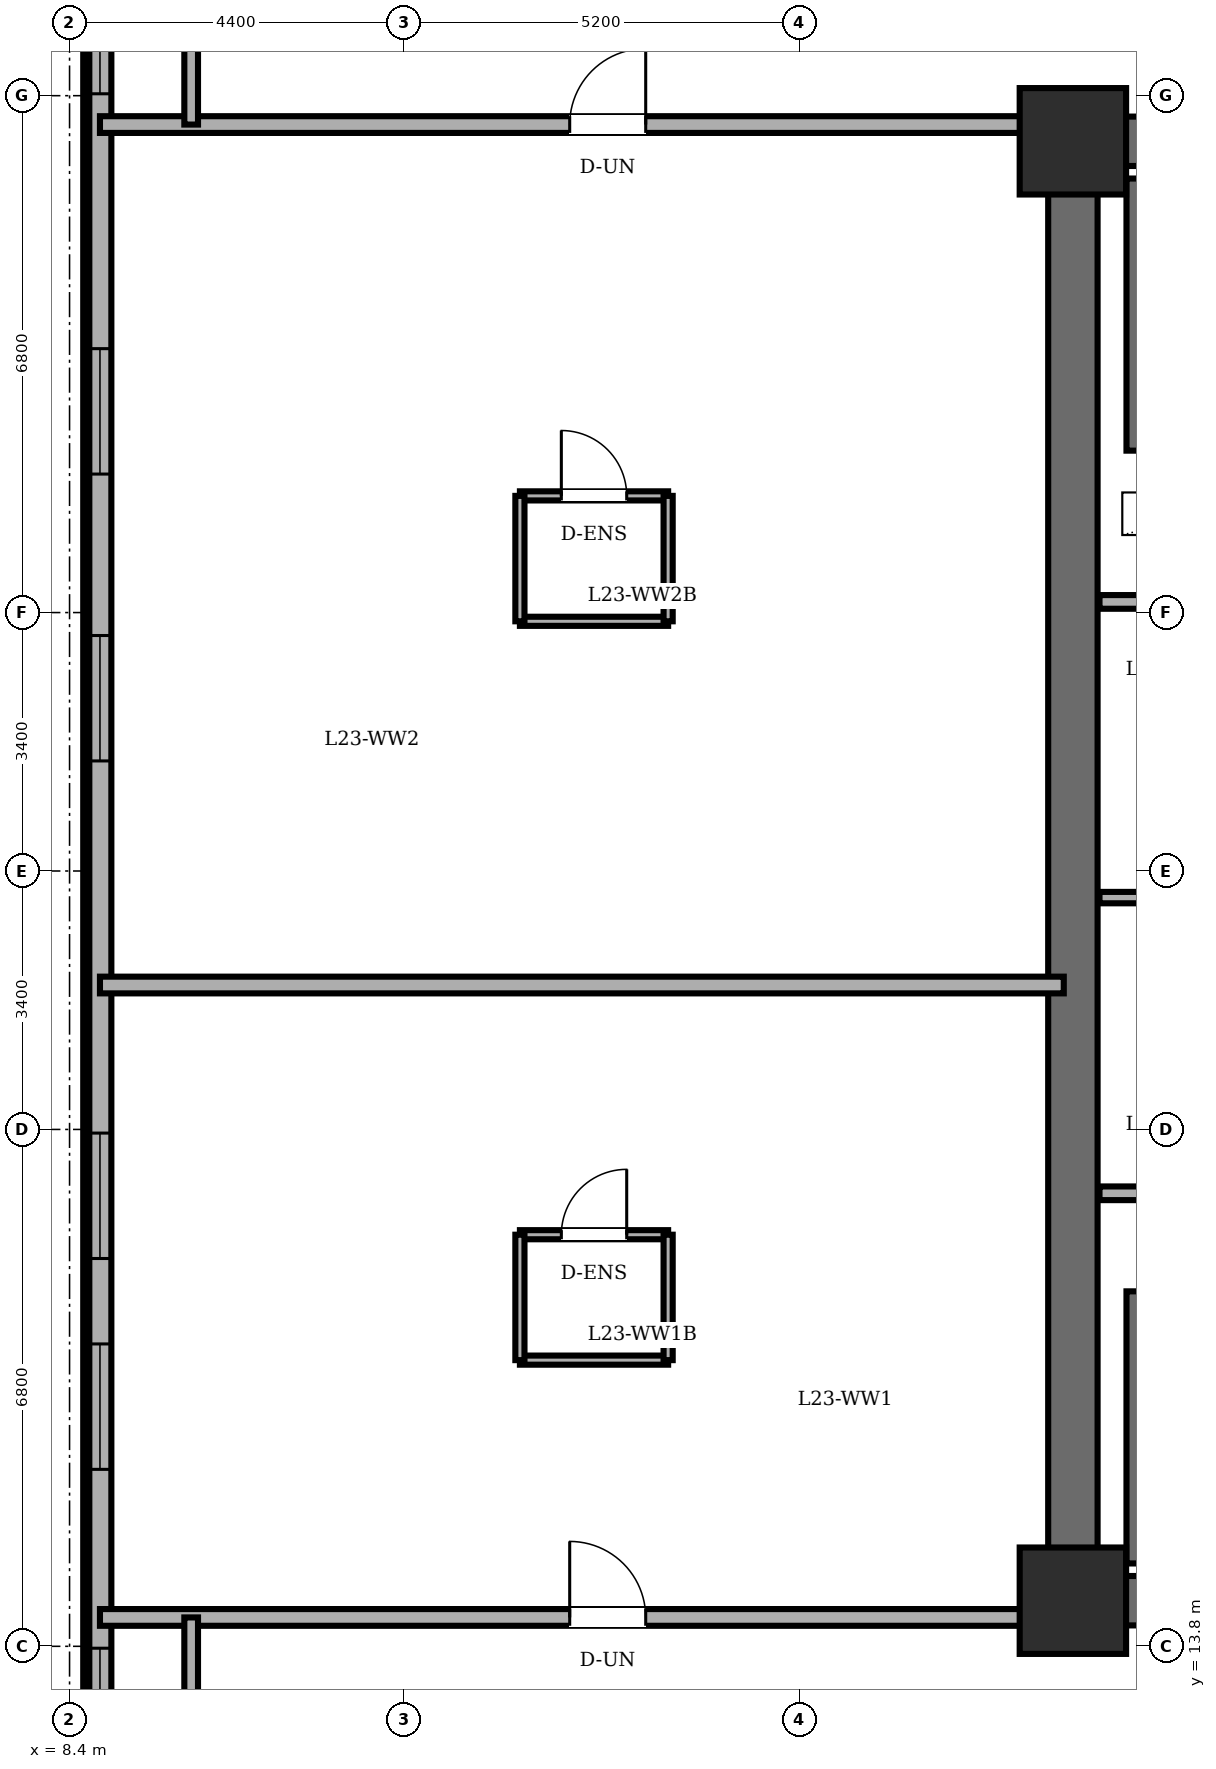
"""IFC4 building model, lengths in metres.
Left out: names, types, materials, properties, quantities, classifications, styles, units other than length and angle.
Written with IfcOpenShell. Run it as: python <this file> out.ifc"""

import sys

from ifc_helpers import new_model, si_unit, direction, frame, frame_2d, origin, origin_2d, place, context, subcontext, project, spatial, rectangle, extrude, element, fill, save


model = new_model("IFC4")
c1 = context("Model", 3, precision=1e-05, world=origin(), true_north=direction((0.0, 1.0)))
c2 = subcontext(c1, "Body", "Model", "MODEL_VIEW")
j1 = project(units=[si_unit("LENGTHUNIT", "METRE"), si_unit("PLANEANGLEUNIT", "RADIAN")], contexts=[c1])
p1 = place(None, origin())
s1 = spatial("IfcSite", under=j1, at=p1, CompositionType="ELEMENT")
p2 = place(p1, origin())
s2 = spatial("IfcBuilding", under=s1, at=p2, CompositionType="ELEMENT")
p3 = place(p2, frame((0.0, 0.0, 89.9)))
s3 = spatial("IfcBuildingStorey", under=s2, at=p3, CompositionType="ELEMENT", Elevation=89.9)
for number, where, z_axis, x_axis in (
    (1, (21.6, 14.4, 0.0), (0.0, 0.0, 1.0), (1.0, 0.0, 0.0)),
    (2, (21.6, 33.6, 0.0), (0.0, 0.0, 1.0), (1.0, 0.0, 0.0)),
):
    element("IfcColumn", number, at=place(p3, frame(where, z_axis=z_axis, x_axis=x_axis)), inside=s3, PredefinedType="COLUMN", context=c2, shape_type="SweptSolid", body=[
        extrude(rectangle(XDim=1.4, YDim=1.4, at=origin_2d()), origin(), (0.0, 0.0, 1.0), 3.6),
    ])
p4 = place(p3, frame((8.8, 38.2, 0.0), z_axis=(0.0, 0.0, 1.0), x_axis=(0.0, -1.0, 0.0)))
e3 = element("IfcWall", 3, at=p4, inside=s3, PredefinedType="SOLIDWALL", context=c2, shape_type="SweptSolid", body=[
    extrude(rectangle(XDim=28.4, YDim=0.3, at=frame_2d((14.2, 0.0))), origin(), (0.0, 0.0, 1.0), 3.4),
])
p5 = place(p4, frame((2.325, 0.0, 0.85)))
e4 = element("IfcOpeningElement", 4, at=p5, cuts=e3, PredefinedType="OPENING", context=c2, shape_type="SweptSolid", body=[
    extrude(rectangle(XDim=1.65, YDim=1.55, at=frame_2d((0.825, 0.775))), frame((0.0, 0.16, 0.0), z_axis=(0.0, -1.0, 0.0), x_axis=(1.0, 0.0, 0.0)), (0.0, 0.0, 1.0), 0.32),
])
p6 = place(p4, frame((7.328, 0.0, 0.85)))
e5 = element("IfcOpeningElement", 5, at=p6, cuts=e3, PredefinedType="OPENING", context=c2, shape_type="SweptSolid", body=[
    extrude(rectangle(XDim=1.65, YDim=1.55, at=frame_2d((0.825, 0.775))), frame((0.0, 0.16, 0.0), z_axis=(0.0, -1.0, 0.0), x_axis=(1.0, 0.0, 0.0)), (0.0, 0.0, 1.0), 0.32),
])
p7 = place(p4, frame((11.102, 0.0, 0.85)))
e6 = element("IfcOpeningElement", 6, at=p7, cuts=e3, PredefinedType="OPENING", context=c2, shape_type="SweptSolid", body=[
    extrude(rectangle(XDim=1.65, YDim=1.55, at=frame_2d((0.825, 0.775))), frame((0.0, 0.16, 0.0), z_axis=(0.0, -1.0, 0.0), x_axis=(1.0, 0.0, 0.0)), (0.0, 0.0, 1.0), 0.32),
])
p8 = place(p4, frame((17.648, 0.0, 0.85)))
e7 = element("IfcOpeningElement", 7, at=p8, cuts=e3, PredefinedType="OPENING", context=c2, shape_type="SweptSolid", body=[
    extrude(rectangle(XDim=1.65, YDim=1.55, at=frame_2d((0.825, 0.775))), frame((0.0, 0.16, 0.0), z_axis=(0.0, -1.0, 0.0), x_axis=(1.0, 0.0, 0.0)), (0.0, 0.0, 1.0), 0.32),
])
p9 = place(p4, frame((20.422, 0.0, 0.85)))
e8 = element("IfcOpeningElement", 8, at=p9, cuts=e3, PredefinedType="OPENING", context=c2, shape_type="SweptSolid", body=[
    extrude(rectangle(XDim=1.65, YDim=1.55, at=frame_2d((0.825, 0.775))), frame((0.0, 0.16, 0.0), z_axis=(0.0, -1.0, 0.0), x_axis=(1.0, 0.0, 0.0)), (0.0, 0.0, 1.0), 0.32),
])
p10 = place(p4, frame((24.425, 0.0, 0.85)))
e9 = element("IfcOpeningElement", 9, at=p10, cuts=e3, PredefinedType="OPENING", context=c2, shape_type="SweptSolid", body=[
    extrude(rectangle(XDim=1.65, YDim=1.55, at=frame_2d((0.825, 0.775))), frame((0.0, 0.16, 0.0), z_axis=(0.0, -1.0, 0.0), x_axis=(1.0, 0.0, 0.0)), (0.0, 0.0, 1.0), 0.32),
])
p11 = place(p3, frame((21.6, 14.4, 0.0), z_axis=(0.0, 0.0, 1.0), x_axis=(0.0, 1.0, 0.0)))
e10 = element("IfcWall", 10, at=p11, inside=s3, PredefinedType="SHEAR", context=c2, shape_type="SweptSolid", body=[
    extrude(rectangle(XDim=19.2, YDim=0.65, at=frame_2d((9.6, 0.0))), origin(), (0.0, 0.0, 1.0), 3.4),
])
for number, where, z_axis, x_axis in (
    (11, (21.6, 33.6, 0.0), (0.0, 0.0, 1.0), (1.0, 0.0, 0.0)),
    (12, (37.2, 14.4, 0.0), (0.0, 0.0, 1.0), (-1.0, 0.0, 0.0)),
):
    element("IfcWall", number, at=place(p3, frame(where, z_axis=z_axis, x_axis=x_axis)), inside=s3, PredefinedType="SHEAR", context=c2, shape_type="SweptSolid", body=[
        extrude(rectangle(XDim=15.6, YDim=0.65, at=frame_2d((7.8, 0.0))), origin(), (0.0, 0.0, 1.0), 3.4),
    ])
for number, where, z_axis, x_axis in (
    (13, (22.48, 29.53, 0.0), (0.0, 0.0, 1.0), (0.0, 1.0, 0.0)),
    (14, (22.48, 14.89, 0.0), (0.0, 0.0, 1.0), (0.0, 1.0, 0.0)),
):
    element("IfcWall", number, at=place(p3, frame(where, z_axis=z_axis, x_axis=x_axis)), inside=s3, PredefinedType="SOLIDWALL", context=c2, shape_type="SweptSolid", body=[
        extrude(rectangle(XDim=3.58, YDim=0.35, at=frame_2d((1.79, 0.0))), origin(), (0.0, 0.0, 1.0), 3.4),
    ])
p12 = place(p3, frame((21.95, 27.54, 0.0), z_axis=(0.0, 0.0, 1.0), x_axis=(1.0, 0.0, 0.0)))
e15 = element("IfcWall", 15, at=p12, inside=s3, PredefinedType="PARTITIONING", context=c2, shape_type="SweptSolid", body=[
    extrude(rectangle(XDim=10.56, YDim=0.18, at=frame_2d((5.28, 0.0))), origin(), (0.0, 0.0, 1.0), 3.4),
])
p13 = place(p3, frame((21.95, 19.76, 0.0), z_axis=(0.0, 0.0, 1.0), x_axis=(1.0, 0.0, 0.0)))
e16 = element("IfcWall", 16, at=p13, inside=s3, PredefinedType="PARTITIONING", context=c2, shape_type="SweptSolid", body=[
    extrude(rectangle(XDim=14.87, YDim=0.18, at=frame_2d((7.435, 0.0))), origin(), (0.0, 0.0, 1.0), 3.4),
])
p14 = place(p3, frame((21.95, 23.65, 0.0), z_axis=(0.0, 0.0, 1.0), x_axis=(1.0, 0.0, 0.0)))
e17 = element("IfcWall", 17, at=p14, inside=s3, PredefinedType="PARTITIONING", context=c2, shape_type="SweptSolid", body=[
    extrude(rectangle(XDim=2.51, YDim=0.15, at=frame_2d((1.255, 0.0))), origin(), (0.0, 0.0, 1.0), 3.4),
])
p15 = place(p3, frame((14.325, 19.215, 0.0), z_axis=(0.0, 0.0, 1.0), x_axis=(1.0, 0.0, 0.0)))
e18 = element("IfcWall", 18, at=p15, inside=s3, PredefinedType="PARTITIONING", context=c2, shape_type="SweptSolid", body=[
    extrude(rectangle(XDim=1.95, YDim=0.12, at=frame_2d((0.975, 0.0))), origin(), (0.0, 0.0, 1.0), 3.4),
])
p16 = place(p15, frame((0.545, 0.0, 0.0)))
e19 = element("IfcOpeningElement", 19, at=p16, cuts=e18, PredefinedType="OPENING", context=c2, shape_type="SweptSolid", body=[
    extrude(rectangle(XDim=0.86, YDim=2.1, at=frame_2d((0.43, 1.05))), frame((0.0, 0.07, 0.0), z_axis=(0.0, -1.0, 0.0), x_axis=(1.0, 0.0, 0.0)), (0.0, 0.0, 1.0), 0.14),
])
p17 = place(p3, frame((16.275, 17.565, 0.0), z_axis=(0.0, 0.0, 1.0), x_axis=(-1.0, 0.0, 0.0)))
e20 = element("IfcWall", 20, at=p17, inside=s3, PredefinedType="PARTITIONING", context=c2, shape_type="SweptSolid", body=[
    extrude(rectangle(XDim=1.95, YDim=0.12, at=frame_2d((0.975, 0.0))), origin(), (0.0, 0.0, 1.0), 3.4),
])
for number, where, z_axis, x_axis in (
    (21, (14.325, 19.215, 0.0), (0.0, 0.0, 1.0), (0.0, -1.0, 0.0)),
    (22, (16.275, 17.565, 0.0), (0.0, 0.0, 1.0), (0.0, 1.0, 0.0)),
):
    element("IfcWall", number, at=place(p3, frame(where, z_axis=z_axis, x_axis=x_axis)), inside=s3, PredefinedType="PARTITIONING", context=c2, shape_type="SweptSolid", body=[
        extrude(rectangle(XDim=1.65, YDim=0.12, at=frame_2d((0.825, 0.0))), origin(), (0.0, 0.0, 1.0), 3.4),
    ])
p18 = place(p3, frame((14.325, 28.935, 0.0), z_axis=(0.0, 0.0, 1.0), x_axis=(1.0, 0.0, 0.0)))
e23 = element("IfcWall", 23, at=p18, inside=s3, PredefinedType="PARTITIONING", context=c2, shape_type="SweptSolid", body=[
    extrude(rectangle(XDim=1.95, YDim=0.12, at=frame_2d((0.975, 0.0))), origin(), (0.0, 0.0, 1.0), 3.4),
])
p19 = place(p18, frame((0.545, 0.0, 0.0)))
e24 = element("IfcOpeningElement", 24, at=p19, cuts=e23, PredefinedType="OPENING", context=c2, shape_type="SweptSolid", body=[
    extrude(rectangle(XDim=0.86, YDim=2.1, at=frame_2d((0.43, 1.05))), frame((0.0, 0.07, 0.0), z_axis=(0.0, -1.0, 0.0), x_axis=(1.0, 0.0, 0.0)), (0.0, 0.0, 1.0), 0.14),
])
p20 = place(p3, frame((16.275, 27.285, 0.0), z_axis=(0.0, 0.0, 1.0), x_axis=(-1.0, 0.0, 0.0)))
e25 = element("IfcWall", 25, at=p20, inside=s3, PredefinedType="PARTITIONING", context=c2, shape_type="SweptSolid", body=[
    extrude(rectangle(XDim=1.95, YDim=0.12, at=frame_2d((0.975, 0.0))), origin(), (0.0, 0.0, 1.0), 3.4),
])
for number, where, z_axis, x_axis in (
    (26, (14.325, 28.935, 0.0), (0.0, 0.0, 1.0), (0.0, -1.0, 0.0)),
    (27, (16.275, 27.285, 0.0), (0.0, 0.0, 1.0), (0.0, 1.0, 0.0)),
):
    element("IfcWall", number, at=place(p3, frame(where, z_axis=z_axis, x_axis=x_axis)), inside=s3, PredefinedType="PARTITIONING", context=c2, shape_type="SweptSolid", body=[
        extrude(rectangle(XDim=1.65, YDim=0.12, at=frame_2d((0.825, 0.0))), origin(), (0.0, 0.0, 1.0), 3.4),
    ])
p21 = place(p3, frame((8.8, 14.18, 0.0), z_axis=(0.0, 0.0, 1.0), x_axis=(1.0, 0.0, 0.0)))
e28 = element("IfcWall", 28, at=p21, inside=s3, PredefinedType="PARTITIONING", context=c2, shape_type="SweptSolid", body=[
    extrude(rectangle(XDim=12.68, YDim=0.22, at=frame_2d((6.34, 0.0))), origin(), (0.0, 0.0, 1.0), 3.4),
])
p22 = place(p21, frame((6.18, 0.0, 0.0)))
e29 = element("IfcOpeningElement", 29, at=p22, cuts=e28, PredefinedType="OPENING", context=c2, shape_type="SweptSolid", body=[
    extrude(rectangle(XDim=1.0, YDim=2.15, at=frame_2d((0.5, 1.075))), frame((0.0, 0.12, 0.0), z_axis=(0.0, -1.0, 0.0), x_axis=(1.0, 0.0, 0.0)), (0.0, 0.0, 1.0), 0.24),
])
p23 = place(p3, frame((8.8, 22.5, 0.0), z_axis=(0.0, 0.0, 1.0), x_axis=(1.0, 0.0, 0.0)))
e30 = element("IfcWall", 30, at=p23, inside=s3, PredefinedType="PARTITIONING", context=c2, shape_type="SweptSolid", body=[
    extrude(rectangle(XDim=12.68, YDim=0.22, at=frame_2d((6.34, 0.0))), origin(), (0.0, 0.0, 1.0), 3.4),
])
p24 = place(p3, frame((8.8, 33.82, 0.0), z_axis=(0.0, 0.0, 1.0), x_axis=(1.0, 0.0, 0.0)))
e31 = element("IfcWall", 31, at=p24, inside=s3, PredefinedType="PARTITIONING", context=c2, shape_type="SweptSolid", body=[
    extrude(rectangle(XDim=12.68, YDim=0.22, at=frame_2d((6.34, 0.0))), origin(), (0.0, 0.0, 1.0), 3.4),
])
p25 = place(p24, frame((6.18, 0.0, 0.0)))
e32 = element("IfcOpeningElement", 32, at=p25, cuts=e31, PredefinedType="OPENING", context=c2, shape_type="SweptSolid", body=[
    extrude(rectangle(XDim=1.0, YDim=2.15, at=frame_2d((0.5, 1.075))), frame((0.0, 0.12, 0.0), z_axis=(0.0, -1.0, 0.0), x_axis=(1.0, 0.0, 0.0)), (0.0, 0.0, 1.0), 0.24),
])
for number, where, z_axis, x_axis in (
    (33, (10.0, 11.72, 0.0), (0.0, 0.0, 1.0), (0.0, 1.0, 0.0)),
    (34, (10.0, 33.82, 0.0), (0.0, 0.0, 1.0), (0.0, 1.0, 0.0)),
):
    element("IfcWall", number, at=place(p3, frame(where, z_axis=z_axis, x_axis=x_axis)), inside=s3, PredefinedType="PARTITIONING", context=c2, shape_type="SweptSolid", body=[
        extrude(rectangle(XDim=2.46, YDim=0.18, at=frame_2d((1.23, 0.0))), origin(), (0.0, 0.0, 1.0), 3.4),
    ])
p26 = place(p5, origin())
e35 = element("IfcWindow", 35, at=p26, inside=s3, PartitioningType="DOUBLE_PANEL_VERTICAL", PredefinedType="WINDOW", context=c2, shape_type="SweptSolid", body=[
    extrude(rectangle(XDim=1.65, YDim=1.55, at=frame_2d((0.825, 0.775))), frame((0.0, 0.03, 0.0), z_axis=(0.0, -1.0, 0.0), x_axis=(1.0, 0.0, 0.0)), (0.0, 0.0, 1.0), 0.06),
])
fill(e4, e35)
p27 = place(p6, origin())
e36 = element("IfcWindow", 36, at=p27, inside=s3, PartitioningType="DOUBLE_PANEL_VERTICAL", PredefinedType="WINDOW", context=c2, shape_type="SweptSolid", body=[
    extrude(rectangle(XDim=1.65, YDim=1.55, at=frame_2d((0.825, 0.775))), frame((0.0, 0.03, 0.0), z_axis=(0.0, -1.0, 0.0), x_axis=(1.0, 0.0, 0.0)), (0.0, 0.0, 1.0), 0.06),
])
fill(e5, e36)
p28 = place(p7, origin())
e37 = element("IfcWindow", 37, at=p28, inside=s3, PartitioningType="DOUBLE_PANEL_VERTICAL", PredefinedType="WINDOW", context=c2, shape_type="SweptSolid", body=[
    extrude(rectangle(XDim=1.65, YDim=1.55, at=frame_2d((0.825, 0.775))), frame((0.0, 0.03, 0.0), z_axis=(0.0, -1.0, 0.0), x_axis=(1.0, 0.0, 0.0)), (0.0, 0.0, 1.0), 0.06),
])
fill(e6, e37)
p29 = place(p8, origin())
e38 = element("IfcWindow", 38, at=p29, inside=s3, PartitioningType="DOUBLE_PANEL_VERTICAL", PredefinedType="WINDOW", context=c2, shape_type="SweptSolid", body=[
    extrude(rectangle(XDim=1.65, YDim=1.55, at=frame_2d((0.825, 0.775))), frame((0.0, 0.03, 0.0), z_axis=(0.0, -1.0, 0.0), x_axis=(1.0, 0.0, 0.0)), (0.0, 0.0, 1.0), 0.06),
])
fill(e7, e38)
p30 = place(p9, origin())
e39 = element("IfcWindow", 39, at=p30, inside=s3, PartitioningType="DOUBLE_PANEL_VERTICAL", PredefinedType="WINDOW", context=c2, shape_type="SweptSolid", body=[
    extrude(rectangle(XDim=1.65, YDim=1.55, at=frame_2d((0.825, 0.775))), frame((0.0, 0.03, 0.0), z_axis=(0.0, -1.0, 0.0), x_axis=(1.0, 0.0, 0.0)), (0.0, 0.0, 1.0), 0.06),
])
fill(e8, e39)
p31 = place(p10, origin())
e40 = element("IfcWindow", 40, at=p31, inside=s3, PartitioningType="DOUBLE_PANEL_VERTICAL", PredefinedType="WINDOW", context=c2, shape_type="SweptSolid", body=[
    extrude(rectangle(XDim=1.65, YDim=1.55, at=frame_2d((0.825, 0.775))), frame((0.0, 0.03, 0.0), z_axis=(0.0, -1.0, 0.0), x_axis=(1.0, 0.0, 0.0)), (0.0, 0.0, 1.0), 0.06),
])
fill(e9, e40)
p32 = place(p16, origin())
e41 = element("IfcDoor", 41, at=p32, inside=s3, OperationType="SINGLE_SWING_RIGHT", PredefinedType="DOOR", context=c2, shape_type="SweptSolid", body=[
    extrude(rectangle(XDim=0.86, YDim=2.1, at=frame_2d((0.43, 1.05))), frame((0.0, 0.025, 0.0), z_axis=(0.0, -1.0, 0.0), x_axis=(1.0, 0.0, 0.0)), (0.0, 0.0, 1.0), 0.05),
])
fill(e19, e41)
p33 = place(p19, origin())
e42 = element("IfcDoor", 42, at=p33, inside=s3, OperationType="SINGLE_SWING_LEFT", PredefinedType="DOOR", context=c2, shape_type="SweptSolid", body=[
    extrude(rectangle(XDim=0.86, YDim=2.1, at=frame_2d((0.43, 1.05))), frame((0.0, 0.025, 0.0), z_axis=(0.0, -1.0, 0.0), x_axis=(1.0, 0.0, 0.0)), (0.0, 0.0, 1.0), 0.05),
])
fill(e24, e42)
p34 = place(p22, origin())
e43 = element("IfcDoor", 43, at=p34, inside=s3, OperationType="SINGLE_SWING_LEFT", PredefinedType="DOOR", context=c2, shape_type="SweptSolid", body=[
    extrude(rectangle(XDim=1.0, YDim=2.15, at=frame_2d((0.5, 1.075))), frame((0.0, 0.025, 0.0), z_axis=(0.0, -1.0, 0.0), x_axis=(1.0, 0.0, 0.0)), (0.0, 0.0, 1.0), 0.05),
])
fill(e29, e43)
p35 = place(p25, origin())
e44 = element("IfcDoor", 44, at=p35, inside=s3, OperationType="SINGLE_SWING_RIGHT", PredefinedType="DOOR", context=c2, shape_type="SweptSolid", body=[
    extrude(rectangle(XDim=1.0, YDim=2.15, at=frame_2d((0.5, 1.075))), frame((0.0, 0.025, 0.0), z_axis=(0.0, -1.0, 0.0), x_axis=(1.0, 0.0, 0.0)), (0.0, 0.0, 1.0), 0.05),
])
fill(e32, e44)
save(model, sys.argv[1])
